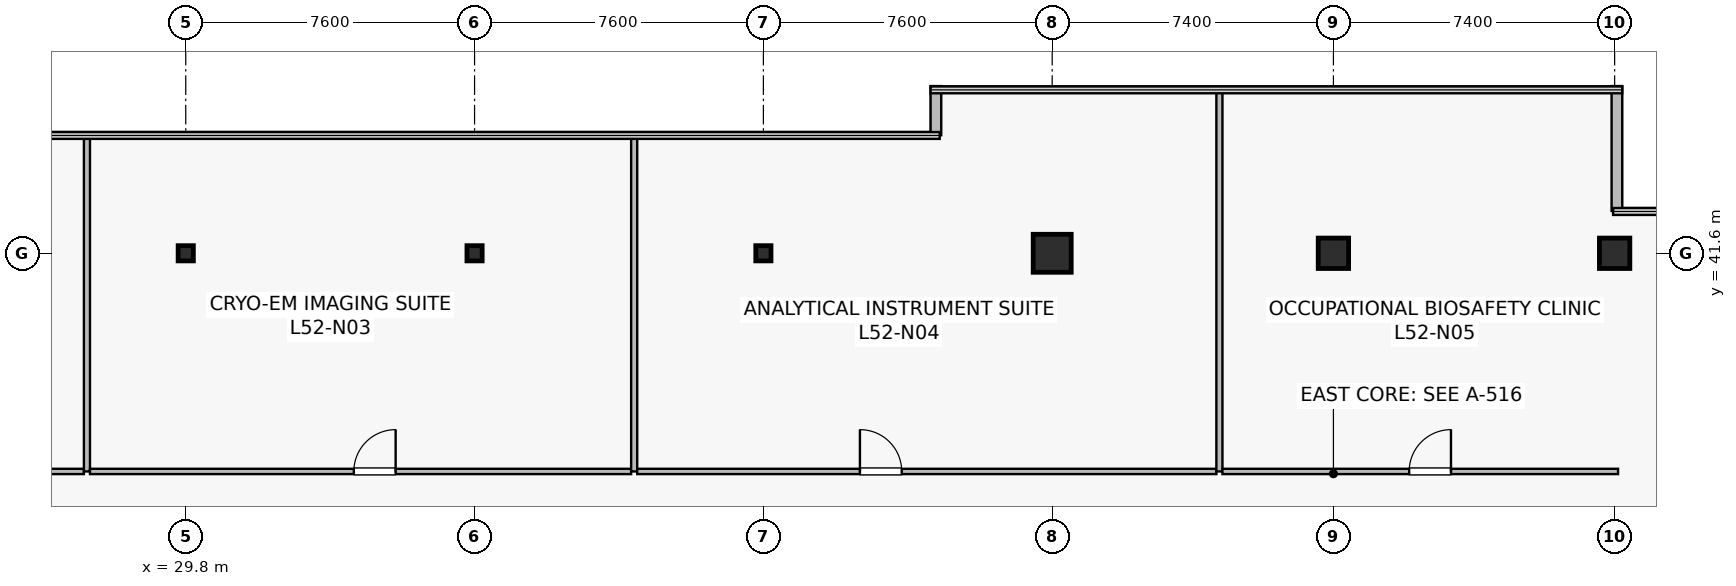
"""IFC4 building model, lengths in metres.
Left out: names, types, materials, properties, quantities, classifications, styles, units other than length and angle.
Written with IfcOpenShell. Run it as: python <this file> out.ifc"""

import sys

from ifc_helpers import new_model, si_unit, direction, frame, frame_2d, origin, origin_2d, place, context, subcontext, project, spatial, rectangle, hollow_rectangle, extrude, source, transform, mapped, element, fill, save


model = new_model("IFC4")
c1 = context("Model", 3, precision=1e-05, world=origin(), true_north=direction((0.0, 1.0)))
c2 = subcontext(c1, "Body", "Model", "MODEL_VIEW")
j1 = project(units=[si_unit("LENGTHUNIT", "METRE"), si_unit("PLANEANGLEUNIT", "RADIAN")], contexts=[c1])
p1 = place(None, origin())
s1 = spatial("IfcSite", under=j1, at=p1, CompositionType="ELEMENT")
p2 = place(p1, origin())
s2 = spatial("IfcBuilding", under=s1, at=p2, CompositionType="ELEMENT")
p3 = place(p2, frame((0.0, 0.0, 217.8)))
s3 = spatial("IfcBuildingStorey", under=s2, at=p3, CompositionType="ELEMENT", Elevation=217.8)
m1 = source(origin(), c2, "Body", "SweptSolid", [
    extrude(rectangle(XDim=1.0, YDim=1.0, at=origin_2d()), origin(), (0.0, 0.0, 1.0), 4.1),
])
p4 = place(p3, frame((52.6, 41.6, 0.0), z_axis=(0.0, 0.0, 1.0), x_axis=(1.0, 0.0, 0.0)))
e1 = element("IfcColumn", 1, at=p4, inside=s3, PredefinedType="COLUMN", context=c2, shape_type="MappedRepresentation", body=[
    mapped(m1, transform((0.0, 0.0, 0.0), scale=1.0)),
])
m2 = source(origin(), c2, "Body", "SweptSolid", [
    extrude(rectangle(XDim=0.8, YDim=0.8, at=origin_2d()), origin(), (0.0, 0.0, 1.0), 4.1),
])
for number, where, z_axis, x_axis in (
    (2, (60.0, 41.6, 0.0), (0.0, 0.0, 1.0), (1.0, 0.0, 0.0)),
    (3, (67.4, 41.6, 0.0), (0.0, 0.0, 1.0), (1.0, 0.0, 0.0)),
):
    element("IfcColumn", number, at=place(p3, frame(where, z_axis=z_axis, x_axis=x_axis)), inside=s3, PredefinedType="COLUMN", context=c2, shape_type="MappedRepresentation", body=[
        mapped(m2, transform((0.0, 0.0, 0.0), scale=1.0)),
    ])
m3 = source(origin(), c2, "Body", "SweptSolid", [
    extrude(hollow_rectangle(XDim=0.4, YDim=0.4, WallThickness=0.019, at=origin_2d()), origin(), (0.0, 0.0, 1.0), 4.1),
])
for number, where, z_axis, x_axis in (
    (4, (29.8, 41.6, 0.0), (0.0, 0.0, 1.0), (1.0, 0.0, 0.0)),
    (5, (37.4, 41.6, 0.0), (0.0, 0.0, 1.0), (1.0, 0.0, 0.0)),
    (6, (45.0, 41.6, 0.0), (0.0, 0.0, 1.0), (1.0, 0.0, 0.0)),
):
    element("IfcColumn", number, at=place(p3, frame(where, z_axis=z_axis, x_axis=x_axis)), inside=s3, PredefinedType="COLUMN", context=c2, shape_type="MappedRepresentation", body=[
        mapped(m3, transform((0.0, 0.0, 0.0), scale=1.0)),
    ])
p5 = place(p3, frame((67.46, 42.712, 0.0), z_axis=(0.0, 0.0, 1.0), x_axis=(0.0, 1.0, 0.0)))
e7 = element("IfcWall", 7, at=p5, inside=s3, PredefinedType="STANDARD", context=c2, shape_type="SweptSolid", body=[
    extrude(rectangle(XDim=3.288, YDim=0.28, at=frame_2d((1.644, 0.0))), origin(), (0.0, 0.0, 1.0), 3.8),
])
p6 = place(p3, frame((49.54, 46.0, 0.0), z_axis=(0.0, 0.0, 1.0), x_axis=(0.0, -1.0, 0.0)))
e8 = element("IfcWall", 8, at=p6, inside=s3, PredefinedType="STANDARD", context=c2, shape_type="SweptSolid", body=[
    extrude(rectangle(XDim=1.293, YDim=0.28, at=frame_2d((0.646, 0.0))), origin(), (0.0, 0.0, 1.0), 3.8),
])
p7 = place(p3, frame((14.08, 35.86, 0.0), z_axis=(0.0, 0.0, 1.0), x_axis=(1.0, 0.0, 0.0)))
e9 = element("IfcWall", 9, at=p7, inside=s3, PredefinedType="PARTITIONING", context=c2, shape_type="SweptSolid", body=[
    extrude(rectangle(XDim=13.04, YDim=0.14, at=frame_2d((6.52, 0.0))), origin(), (0.0, 0.0, 1.0), 3.197),
])
p8 = place(p7, frame((4.958, 0.0, 0.0)))
e10 = element("IfcOpeningElement", 10, at=p8, cuts=e9, PredefinedType="OPENING", context=c2, shape_type="SweptSolid", body=[
    extrude(rectangle(XDim=1.1, YDim=2.18, at=frame_2d((0.55, 1.09))), frame((0.0, 0.08, 0.0), z_axis=(0.0, -1.0, 0.0), x_axis=(1.0, 0.0, 0.0)), (0.0, 0.0, 1.0), 0.16),
])
p9 = place(p3, frame((27.2, 35.86, 0.0), z_axis=(0.0, 0.0, 1.0), x_axis=(0.0, 1.0, 0.0)))
e11 = element("IfcWall", 11, at=p9, inside=s3, PredefinedType="PARTITIONING", context=c2, shape_type="SweptSolid", body=[
    extrude(rectangle(XDim=8.83, YDim=0.16, at=frame_2d((4.415, 0.0))), origin(), (0.0, 0.0, 1.0), 3.135),
])
p10 = place(p3, frame((27.28, 35.86, 0.0), z_axis=(0.0, 0.0, 1.0), x_axis=(1.0, 0.0, 0.0)))
e12 = element("IfcWall", 12, at=p10, inside=s3, PredefinedType="PARTITIONING", context=c2, shape_type="SweptSolid", body=[
    extrude(rectangle(XDim=14.24, YDim=0.14, at=frame_2d((7.12, 0.0))), origin(), (0.0, 0.0, 1.0), 3.197),
])
p11 = place(p10, frame((6.943, 0.0, 0.0)))
e13 = element("IfcOpeningElement", 13, at=p11, cuts=e12, PredefinedType="OPENING", context=c2, shape_type="SweptSolid", body=[
    extrude(rectangle(XDim=1.1, YDim=2.18, at=frame_2d((0.55, 1.09))), frame((0.0, 0.08, 0.0), z_axis=(0.0, -1.0, 0.0), x_axis=(1.0, 0.0, 0.0)), (0.0, 0.0, 1.0), 0.16),
])
p12 = place(p3, frame((41.6, 35.86, 0.0), z_axis=(0.0, 0.0, 1.0), x_axis=(0.0, 1.0, 0.0)))
e14 = element("IfcWall", 14, at=p12, inside=s3, PredefinedType="PARTITIONING", context=c2, shape_type="SweptSolid", body=[
    extrude(rectangle(XDim=8.83, YDim=0.16, at=frame_2d((4.415, 0.0))), origin(), (0.0, 0.0, 1.0), 3.135),
])
p13 = place(p3, frame((41.68, 35.86, 0.0), z_axis=(0.0, 0.0, 1.0), x_axis=(1.0, 0.0, 0.0)))
e15 = element("IfcWall", 15, at=p13, inside=s3, PredefinedType="PARTITIONING", context=c2, shape_type="SweptSolid", body=[
    extrude(rectangle(XDim=15.24, YDim=0.14, at=frame_2d((7.62, 0.0))), origin(), (0.0, 0.0, 1.0), 3.197),
])
p14 = place(p13, frame((5.86, 0.0, 0.0)))
e16 = element("IfcOpeningElement", 16, at=p14, cuts=e15, PredefinedType="OPENING", context=c2, shape_type="SweptSolid", body=[
    extrude(rectangle(XDim=1.1, YDim=2.18, at=frame_2d((0.55, 1.09))), frame((0.0, 0.08, 0.0), z_axis=(0.0, -1.0, 0.0), x_axis=(1.0, 0.0, 0.0)), (0.0, 0.0, 1.0), 0.16),
])
p15 = place(p3, frame((57.0, 35.86, 0.0), z_axis=(0.0, 0.0, 1.0), x_axis=(0.0, 1.0, 0.0)))
e17 = element("IfcWall", 17, at=p15, inside=s3, PredefinedType="PARTITIONING", context=c2, shape_type="SweptSolid", body=[
    extrude(rectangle(XDim=10.03, YDim=0.16, at=frame_2d((5.015, 0.0))), origin(), (0.0, 0.0, 1.0), 3.135),
])
p16 = place(p3, frame((57.08, 35.86, 0.0), z_axis=(0.0, 0.0, 1.0), x_axis=(1.0, 0.0, 0.0)))
e18 = element("IfcWall", 18, at=p16, inside=s3, PredefinedType="PARTITIONING", context=c2, shape_type="SweptSolid", body=[
    extrude(rectangle(XDim=10.41, YDim=0.14, at=frame_2d((5.205, 0.0))), origin(), (0.0, 0.0, 1.0), 3.197),
])
p17 = place(p16, frame((4.913, 0.0, 0.0)))
e19 = element("IfcOpeningElement", 19, at=p17, cuts=e18, PredefinedType="OPENING", context=c2, shape_type="SweptSolid", body=[
    extrude(rectangle(XDim=1.1, YDim=2.18, at=frame_2d((0.55, 1.09))), frame((0.0, 0.08, 0.0), z_axis=(0.0, -1.0, 0.0), x_axis=(1.0, 0.0, 0.0)), (0.0, 0.0, 1.0), 0.16),
])
m4 = source(origin(), c2, "Body", "SweptSolid", [
    extrude(rectangle(XDim=1.1, YDim=2.18, at=frame_2d((0.55, 1.09))), frame((0.0, 0.025, 0.0), z_axis=(0.0, -1.0, 0.0), x_axis=(1.0, 0.0, 0.0)), (0.0, 0.0, 1.0), 0.05),
])
p18 = place(p11, origin())
e20 = element("IfcDoor", 20, at=p18, inside=s3, OperationType="SINGLE_SWING_RIGHT", PredefinedType="DOOR", context=c2, shape_type="MappedRepresentation", body=[
    mapped(m4, transform((0.0, 0.0, 0.0), scale=1.0)),
])
fill(e13, e20)
p19 = place(p14, origin())
e21 = element("IfcDoor", 21, at=p19, inside=s3, OperationType="SINGLE_SWING_LEFT", PredefinedType="DOOR", context=c2, shape_type="MappedRepresentation", body=[
    mapped(m4, transform((0.0, 0.0, 0.0), scale=1.0)),
])
fill(e16, e21)
p20 = place(p17, origin())
e22 = element("IfcDoor", 22, at=p20, inside=s3, OperationType="SINGLE_SWING_RIGHT", PredefinedType="DOOR", context=c2, shape_type="MappedRepresentation", body=[
    mapped(m4, transform((0.0, 0.0, 0.0), scale=1.0)),
])
fill(e19, e22)
save(model, sys.argv[1])
